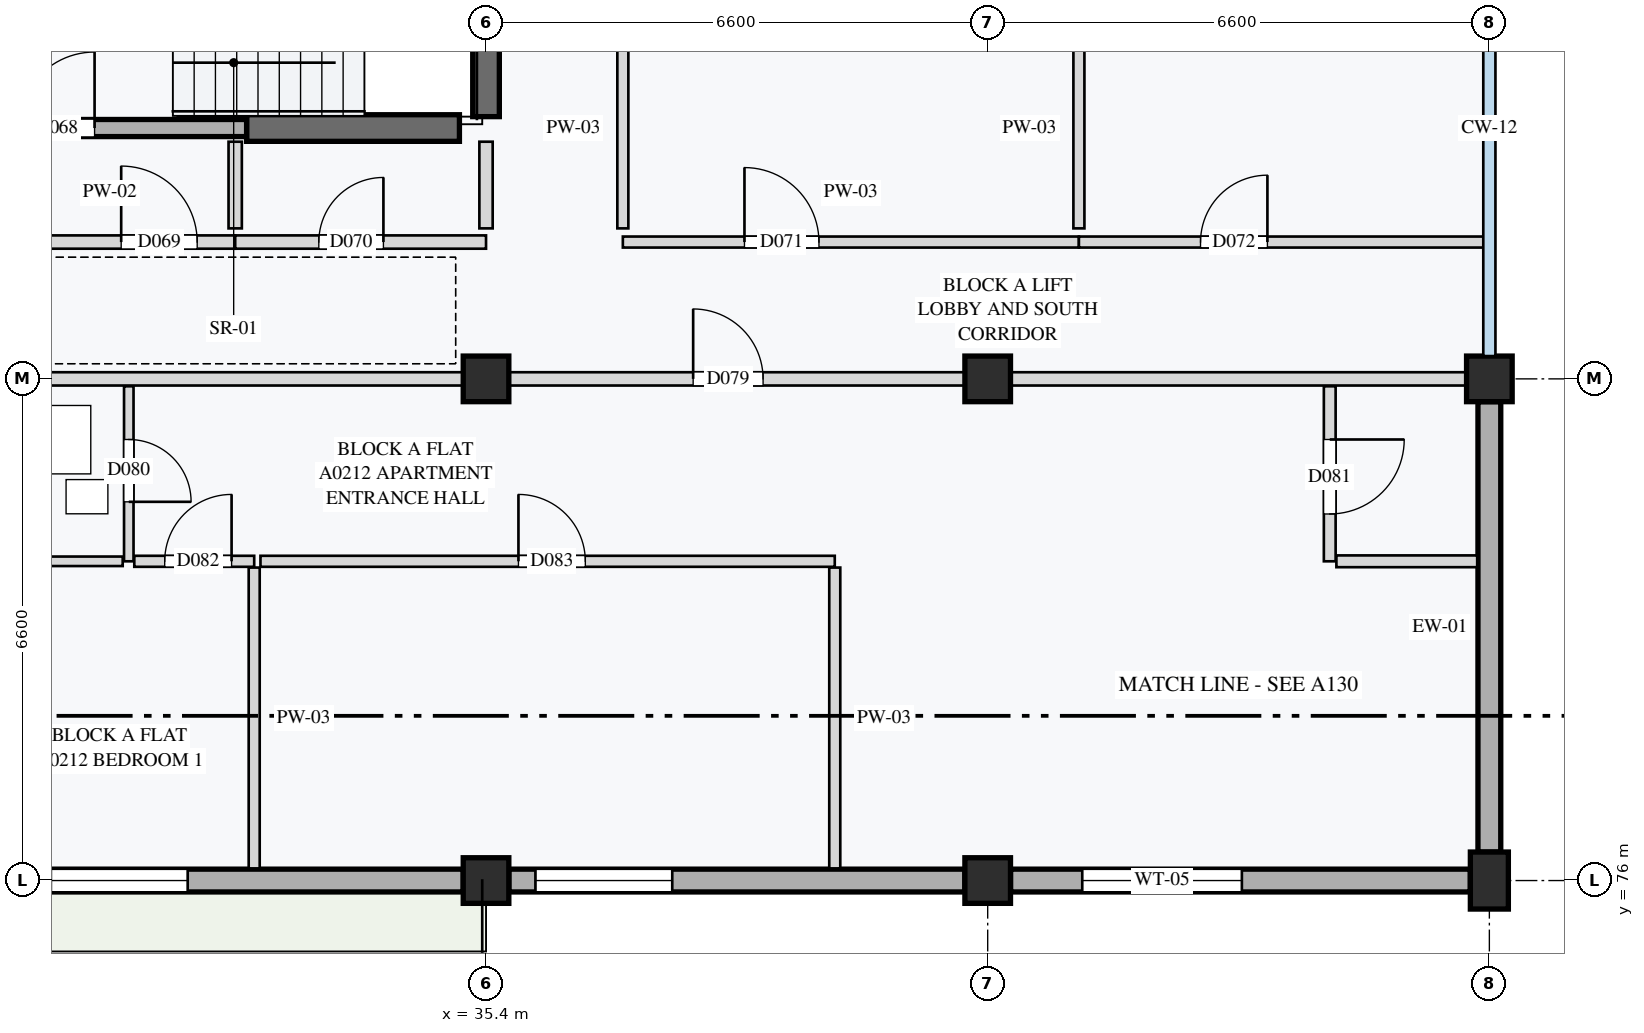
"""IFC4 building model, lengths in metres.
Left out: names, types, materials, properties, quantities, classifications, styles, units other than length and angle.
Written with IfcOpenShell. Run it as: python <this file> out.ifc"""

import sys

from ifc_helpers import new_model, si_unit, direction, frame, frame_2d, origin, origin_2d, place, context, subcontext, project, spatial, rectangle, extrude, element, fill, save


model = new_model("IFC4")
c1 = context("Model", 3, precision=1e-05, world=origin(), true_north=direction((0.0, 1.0)))
c2 = subcontext(c1, "Body", "Model", "MODEL_VIEW")
j1 = project(units=[si_unit("LENGTHUNIT", "METRE"), si_unit("PLANEANGLEUNIT", "RADIAN")], contexts=[c1])
p1 = place(None, origin())
s1 = spatial("IfcSite", under=j1, at=p1, CompositionType="ELEMENT")
p2 = place(p1, origin())
s2 = spatial("IfcBuilding", under=s1, at=p2, CompositionType="ELEMENT")
p3 = place(p2, frame((0.0, 0.0, 8.4)))
s3 = spatial("IfcBuildingStorey", under=s2, at=p3, CompositionType="ELEMENT", Elevation=8.4)
for number, where, z_axis, x_axis in (
    (1, (35.4, 76.0, 0.0), (0.0, 0.0, 1.0), (1.0, 0.0, 0.0)),
    (2, (35.4, 82.6, 0.0), (0.0, 0.0, 1.0), (1.0, 0.0, 0.0)),
    (3, (42.0, 76.0, 0.0), (0.0, 0.0, 1.0), (1.0, 0.0, 0.0)),
    (4, (42.0, 82.6, 0.0), (0.0, 0.0, 1.0), (1.0, 0.0, 0.0)),
):
    element("IfcColumn", number, at=place(p3, frame(where, z_axis=z_axis, x_axis=x_axis)), inside=s3, PredefinedType="COLUMN", context=c2, shape_type="SweptSolid", body=[
        extrude(rectangle(XDim=0.6, YDim=0.6, at=origin_2d()), origin(), (0.0, 0.0, 1.0), 3.2),
    ])
p4 = place(p3, frame((48.6, 76.0, 0.0), z_axis=(0.0, 0.0, 1.0), x_axis=(1.0, 0.0, 0.0)))
e5 = element("IfcColumn", 5, at=p4, inside=s3, PredefinedType="COLUMN", context=c2, shape_type="SweptSolid", body=[
    extrude(rectangle(XDim=0.5, YDim=0.75, at=origin_2d()), origin(), (0.0, 0.0, 1.0), 3.2),
])
p5 = place(p3, frame((48.6, 82.6, 0.0), z_axis=(0.0, 0.0, 1.0), x_axis=(1.0, 0.0, 0.0)))
e6 = element("IfcColumn", 6, at=p5, inside=s3, PredefinedType="COLUMN", context=c2, shape_type="SweptSolid", body=[
    extrude(rectangle(XDim=0.6, YDim=0.6, at=origin_2d()), origin(), (0.0, 0.0, 1.0), 3.2),
])
for number, where, z_axis, x_axis in (
    (7, (32.25, 85.9, 0.0), (0.0, 0.0, 1.0), (1.0, 0.0, 0.0)),
    (8, (35.4, 86.05, 0.0), (0.0, 0.0, 1.0), (0.0, 1.0, 0.0)),
):
    element("IfcWall", number, at=place(p3, frame(where, z_axis=z_axis, x_axis=x_axis)), inside=s3, PredefinedType="SHEAR", context=c2, shape_type="SweptSolid", body=[
        extrude(rectangle(XDim=2.8, YDim=0.35, at=frame_2d((1.4, 0.0))), origin(), (0.0, 0.0, 1.0), 2.96),
    ])
p6 = place(p3, frame((29.1, 76.0, 0.0), z_axis=(0.0, 0.0, 1.0), x_axis=(1.0, 0.0, 0.0)))
e9 = element("IfcWall", 9, at=p6, inside=s3, PredefinedType="STANDARD", context=c2, shape_type="SweptSolid", body=[
    extrude(rectangle(XDim=6.0, YDim=0.3, at=frame_2d((3.0, 0.0))), origin(), (0.0, 0.0, 1.0), 2.65),
])
p7 = place(p6, frame((0.575, 0.0, 0.85)))
e10 = element("IfcOpeningElement", 10, at=p7, cuts=e9, PredefinedType="OPENING", context=c2, shape_type="SweptSolid", body=[
    extrude(rectangle(XDim=1.8, YDim=1.35, at=frame_2d((0.9, 0.675))), frame((0.0, 0.16, 0.0), z_axis=(0.0, -1.0, 0.0), x_axis=(1.0, 0.0, 0.0)), (0.0, 0.0, 1.0), 0.32),
])
p8 = place(p3, frame((35.7, 76.0, 0.0), z_axis=(0.0, 0.0, 1.0), x_axis=(1.0, 0.0, 0.0)))
e11 = element("IfcWall", 11, at=p8, inside=s3, PredefinedType="STANDARD", context=c2, shape_type="SweptSolid", body=[
    extrude(rectangle(XDim=6.0, YDim=0.3, at=frame_2d((3.0, 0.0))), origin(), (0.0, 0.0, 1.0), 2.65),
])
p9 = place(p8, frame((0.35, 0.0, 0.85)))
e12 = element("IfcOpeningElement", 12, at=p9, cuts=e11, PredefinedType="OPENING", context=c2, shape_type="SweptSolid", body=[
    extrude(rectangle(XDim=1.8, YDim=1.35, at=frame_2d((0.9, 0.675))), frame((0.0, 0.16, 0.0), z_axis=(0.0, -1.0, 0.0), x_axis=(1.0, 0.0, 0.0)), (0.0, 0.0, 1.0), 0.32),
])
p10 = place(p3, frame((42.3, 76.0, 0.0), z_axis=(0.0, 0.0, 1.0), x_axis=(1.0, 0.0, 0.0)))
e13 = element("IfcWall", 13, at=p10, inside=s3, PredefinedType="STANDARD", context=c2, shape_type="SweptSolid", body=[
    extrude(rectangle(XDim=6.05, YDim=0.3, at=frame_2d((3.025, 0.0))), origin(), (0.0, 0.0, 1.0), 2.65),
])
p11 = place(p10, frame((0.944, 0.0, 0.85)))
e14 = element("IfcOpeningElement", 14, at=p11, cuts=e13, PredefinedType="OPENING", context=c2, shape_type="SweptSolid", body=[
    extrude(rectangle(XDim=2.1, YDim=1.55, at=frame_2d((1.05, 0.775))), frame((0.0, 0.16, 0.0), z_axis=(0.0, -1.0, 0.0), x_axis=(1.0, 0.0, 0.0)), (0.0, 0.0, 1.0), 0.32),
])
p12 = place(p3, frame((48.6, 76.375, 0.0), z_axis=(0.0, 0.0, 1.0), x_axis=(0.0, 1.0, 0.0)))
e15 = element("IfcWall", 15, at=p12, inside=s3, PredefinedType="STANDARD", context=c2, shape_type="SweptSolid", body=[
    extrude(rectangle(XDim=5.925, YDim=0.3, at=frame_2d((2.962, 0.0))), origin(), (0.0, 0.0, 1.0), 2.65),
])
p13 = place(p3, frame((28.8, 85.9, 0.0), z_axis=(0.0, 0.0, 1.0), x_axis=(1.0, 0.0, 0.0)))
e16 = element("IfcWall", 16, at=p13, inside=s3, PredefinedType="STANDARD", context=c2, shape_type="SweptSolid", body=[
    extrude(rectangle(XDim=3.45, YDim=0.225, at=frame_2d((1.725, 0.0))), origin(), (0.0, 0.0, 1.0), 2.96),
])
p14 = place(p13, frame((0.45, 0.0, 0.0)))
e17 = element("IfcOpeningElement", 17, at=p14, cuts=e16, PredefinedType="OPENING", context=c2, shape_type="SweptSolid", body=[
    extrude(rectangle(XDim=1.0, YDim=2.1, at=frame_2d((0.5, 1.05))), frame((0.0, 0.123, 0.0), z_axis=(0.0, -1.0, 0.0), x_axis=(1.0, 0.0, 0.0)), (0.0, 0.0, 1.0), 0.245),
])
p15 = place(p3, frame((28.8, 84.4, 0.0), z_axis=(0.0, 0.0, 1.0), x_axis=(1.0, 0.0, 0.0)))
e18 = element("IfcWall", 18, at=p15, inside=s3, PredefinedType="PARTITIONING", context=c2, shape_type="SweptSolid", body=[
    extrude(rectangle(XDim=3.3, YDim=0.175, at=frame_2d((1.65, 0.0))), origin(), (0.0, 0.0, 1.0), 2.96),
])
p16 = place(p15, frame((1.8, 0.0, 0.0)))
e19 = element("IfcOpeningElement", 19, at=p16, cuts=e18, PredefinedType="OPENING", context=c2, shape_type="SweptSolid", body=[
    extrude(rectangle(XDim=1.0, YDim=2.16, at=frame_2d((0.5, 1.08))), frame((0.0, 0.097, 0.0), z_axis=(0.0, -1.0, 0.0), x_axis=(1.0, 0.0, 0.0)), (0.0, 0.0, 1.0), 0.195),
])
p17 = place(p3, frame((32.1, 84.4, 0.0), z_axis=(0.0, 0.0, 1.0), x_axis=(1.0, 0.0, 0.0)))
e20 = element("IfcWall", 20, at=p17, inside=s3, PredefinedType="PARTITIONING", context=c2, shape_type="SweptSolid", body=[
    extrude(rectangle(XDim=3.3, YDim=0.175, at=frame_2d((1.65, 0.0))), origin(), (0.0, 0.0, 1.0), 2.96),
])
p18 = place(p17, frame((1.1, 0.0, 0.0)))
e21 = element("IfcOpeningElement", 21, at=p18, cuts=e20, PredefinedType="OPENING", context=c2, shape_type="SweptSolid", body=[
    extrude(rectangle(XDim=0.85, YDim=2.0, at=frame_2d((0.425, 1.0))), frame((0.0, 0.097, 0.0), z_axis=(0.0, -1.0, 0.0), x_axis=(1.0, 0.0, 0.0)), (0.0, 0.0, 1.0), 0.195),
])
for number, where, z_axis, x_axis in (
    (22, (32.1, 84.58, 0.0), (0.0, 0.0, 1.0), (0.0, 1.0, 0.0)),
    (23, (35.4, 84.58, 0.0), (0.0, 0.0, 1.0), (0.0, 1.0, 0.0)),
):
    element("IfcWall", number, at=place(p3, frame(where, z_axis=z_axis, x_axis=x_axis)), inside=s3, PredefinedType="PARTITIONING", context=c2, shape_type="SweptSolid", body=[
        extrude(rectangle(XDim=1.14, YDim=0.175, at=frame_2d((0.57, 0.0))), origin(), (0.0, 0.0, 1.0), 2.96),
    ])
p19 = place(p3, frame((37.2, 84.4, 0.0), z_axis=(0.0, 0.0, 1.0), x_axis=(1.0, 0.0, 0.0)))
e24 = element("IfcWall", 24, at=p19, inside=s3, PredefinedType="PARTITIONING", context=c2, shape_type="SweptSolid", body=[
    extrude(rectangle(XDim=6.0, YDim=0.145, at=frame_2d((3.0, 0.0))), origin(), (0.0, 0.0, 1.0), 2.96),
])
p20 = place(p19, frame((1.6, 0.0, 0.0)))
e25 = element("IfcOpeningElement", 25, at=p20, cuts=e24, PredefinedType="OPENING", context=c2, shape_type="SweptSolid", body=[
    extrude(rectangle(XDim=0.98, YDim=2.12, at=frame_2d((0.49, 1.06))), frame((0.0, 0.083, 0.0), z_axis=(0.0, -1.0, 0.0), x_axis=(1.0, 0.0, 0.0)), (0.0, 0.0, 1.0), 0.165),
])
p21 = place(p3, frame((43.2, 84.4, 0.0), z_axis=(0.0, 0.0, 1.0), x_axis=(1.0, 0.0, 0.0)))
e26 = element("IfcWall", 26, at=p21, inside=s3, PredefinedType="PARTITIONING", context=c2, shape_type="SweptSolid", body=[
    extrude(rectangle(XDim=5.4, YDim=0.145, at=frame_2d((2.7, 0.0))), origin(), (0.0, 0.0, 1.0), 2.96),
])
p22 = place(p21, frame((1.6, 0.0, 0.0)))
e27 = element("IfcOpeningElement", 27, at=p22, cuts=e26, PredefinedType="OPENING", context=c2, shape_type="SweptSolid", body=[
    extrude(rectangle(XDim=0.88, YDim=2.1, at=frame_2d((0.44, 1.05))), frame((0.0, 0.083, 0.0), z_axis=(0.0, -1.0, 0.0), x_axis=(1.0, 0.0, 0.0)), (0.0, 0.0, 1.0), 0.165),
])
for number, where, z_axis, x_axis in (
    (28, (43.2, 84.58, 0.0), (0.0, 0.0, 1.0), (0.0, 1.0, 0.0)),
    (29, (37.2, 84.58, 0.0), (0.0, 0.0, 1.0), (0.0, 1.0, 0.0)),
):
    element("IfcWall", number, at=place(p3, frame(where, z_axis=z_axis, x_axis=x_axis)), inside=s3, PredefinedType="PARTITIONING", context=c2, shape_type="SweptSolid", body=[
        extrude(rectangle(XDim=2.64, YDim=0.145, at=frame_2d((1.32, 0.0))), origin(), (0.0, 0.0, 1.0), 2.96),
    ])
p23 = place(p3, frame((28.8, 82.6, 0.0), z_axis=(0.0, 0.0, 1.0), x_axis=(1.0, 0.0, 0.0)))
e30 = element("IfcWall", 30, at=p23, inside=s3, PredefinedType="PARTITIONING", context=c2, shape_type="SweptSolid", body=[
    extrude(rectangle(XDim=19.8, YDim=0.175, at=frame_2d((9.9, 0.0))), origin(), (0.0, 0.0, 1.0), 2.55),
])
p24 = place(p23, frame((9.325, 0.0, 0.0)))
e31 = element("IfcOpeningElement", 31, at=p24, cuts=e30, PredefinedType="OPENING", context=c2, shape_type="SweptSolid", body=[
    extrude(rectangle(XDim=0.92, YDim=2.14, at=frame_2d((0.46, 1.07))), frame((0.0, 0.097, 0.0), z_axis=(0.0, -1.0, 0.0), x_axis=(1.0, 0.0, 0.0)), (0.0, 0.0, 1.0), 0.195),
])
p25 = place(p3, frame((30.7, 82.502, 0.0), z_axis=(0.0, 0.0, 1.0), x_axis=(0.0, -1.0, 0.0)))
e32 = element("IfcWall", 32, at=p25, inside=s3, PredefinedType="PARTITIONING", context=c2, shape_type="SweptSolid", body=[
    extrude(rectangle(XDim=2.302, YDim=0.125, at=frame_2d((1.151, 0.0))), origin(), (0.0, 0.0, 1.0), 2.96),
])
p26 = place(p25, frame((0.7, 0.0, 0.0)))
e33 = element("IfcOpeningElement", 33, at=p26, cuts=e32, PredefinedType="OPENING", context=c2, shape_type="SweptSolid", body=[
    extrude(rectangle(XDim=0.82, YDim=2.05, at=frame_2d((0.41, 1.025))), frame((0.0, 0.073, 0.0), z_axis=(0.0, -1.0, 0.0), x_axis=(1.0, 0.0, 0.0)), (0.0, 0.0, 1.0), 0.145),
])
p27 = place(p3, frame((28.985, 80.2, 0.0), z_axis=(0.0, 0.0, 1.0), x_axis=(1.0, 0.0, 0.0)))
e34 = element("IfcWall", 34, at=p27, inside=s3, PredefinedType="PARTITIONING", context=c2, shape_type="SweptSolid", body=[
    extrude(rectangle(XDim=1.635, YDim=0.125, at=frame_2d((0.817, 0.0))), origin(), (0.0, 0.0, 1.0), 2.96),
])
p28 = place(p3, frame((46.5, 82.502, 0.0), z_axis=(0.0, 0.0, 1.0), x_axis=(0.0, -1.0, 0.0)))
e35 = element("IfcWall", 35, at=p28, inside=s3, PredefinedType="PARTITIONING", context=c2, shape_type="SweptSolid", body=[
    extrude(rectangle(XDim=2.302, YDim=0.155, at=frame_2d((1.151, 0.0))), origin(), (0.0, 0.0, 1.0), 2.96),
])
p29 = place(p28, frame((0.7, 0.0, 0.0)))
e36 = element("IfcOpeningElement", 36, at=p29, cuts=e35, PredefinedType="OPENING", context=c2, shape_type="SweptSolid", body=[
    extrude(rectangle(XDim=0.98, YDim=2.12, at=frame_2d((0.49, 1.06))), frame((0.0, 0.087, 0.0), z_axis=(0.0, -1.0, 0.0), x_axis=(1.0, 0.0, 0.0)), (0.0, 0.0, 1.0), 0.175),
])
p30 = place(p3, frame((46.587, 80.2, 0.0), z_axis=(0.0, 0.0, 1.0), x_axis=(1.0, 0.0, 0.0)))
e37 = element("IfcWall", 37, at=p30, inside=s3, PredefinedType="PARTITIONING", context=c2, shape_type="SweptSolid", body=[
    extrude(rectangle(XDim=1.853, YDim=0.155, at=frame_2d((0.926, 0.0))), origin(), (0.0, 0.0, 1.0), 2.96),
])
p31 = place(p3, frame((30.772, 80.2, 0.0), z_axis=(0.0, 0.0, 1.0), x_axis=(1.0, 0.0, 0.0)))
e38 = element("IfcWall", 38, at=p31, inside=s3, PredefinedType="PARTITIONING", context=c2, shape_type="SweptSolid", body=[
    extrude(rectangle(XDim=1.578, YDim=0.145, at=frame_2d((0.789, 0.0))), origin(), (0.0, 0.0, 1.0), 2.96),
])
p32 = place(p31, frame((0.4, 0.0, 0.0)))
e39 = element("IfcOpeningElement", 39, at=p32, cuts=e38, PredefinedType="OPENING", context=c2, shape_type="SweptSolid", body=[
    extrude(rectangle(XDim=0.88, YDim=2.1, at=frame_2d((0.44, 1.05))), frame((0.0, 0.083, 0.0), z_axis=(0.0, -1.0, 0.0), x_axis=(1.0, 0.0, 0.0)), (0.0, 0.0, 1.0), 0.165),
])
p33 = place(p3, frame((32.35, 80.117, 0.0), z_axis=(0.0, 0.0, 1.0), x_axis=(0.0, -1.0, 0.0)))
e40 = element("IfcWall", 40, at=p33, inside=s3, PredefinedType="PARTITIONING", context=c2, shape_type="SweptSolid", body=[
    extrude(rectangle(XDim=3.958, YDim=0.145, at=frame_2d((1.979, 0.0))), origin(), (0.0, 0.0, 1.0), 2.96),
])
p34 = place(p3, frame((32.433, 80.2, 0.0), z_axis=(0.0, 0.0, 1.0), x_axis=(1.0, 0.0, 0.0)))
e41 = element("IfcWall", 41, at=p34, inside=s3, PredefinedType="PARTITIONING", context=c2, shape_type="SweptSolid", body=[
    extrude(rectangle(XDim=7.555, YDim=0.145, at=frame_2d((3.778, 0.0))), origin(), (0.0, 0.0, 1.0), 2.96),
])
p35 = place(p34, frame((3.394, 0.0, 0.0)))
e42 = element("IfcOpeningElement", 42, at=p35, cuts=e41, PredefinedType="OPENING", context=c2, shape_type="SweptSolid", body=[
    extrude(rectangle(XDim=0.88, YDim=2.16, at=frame_2d((0.44, 1.08))), frame((0.0, 0.083, 0.0), z_axis=(0.0, -1.0, 0.0), x_axis=(1.0, 0.0, 0.0)), (0.0, 0.0, 1.0), 0.165),
])
p36 = place(p3, frame((39.988, 80.117, 0.0), z_axis=(0.0, 0.0, 1.0), x_axis=(0.0, -1.0, 0.0)))
e43 = element("IfcWall", 43, at=p36, inside=s3, PredefinedType="PARTITIONING", context=c2, shape_type="SweptSolid", body=[
    extrude(rectangle(XDim=3.958, YDim=0.145, at=frame_2d((1.979, 0.0))), origin(), (0.0, 0.0, 1.0), 2.96),
])
p37 = place(p7, origin())
e44 = element("IfcWindow", 44, at=p37, inside=s3, PartitioningType="SINGLE_PANEL", PredefinedType="WINDOW", context=c2, shape_type="SweptSolid", body=[
    extrude(rectangle(XDim=1.8, YDim=1.35, at=frame_2d((0.9, 0.675))), frame((0.0, 0.03, 0.0), z_axis=(0.0, -1.0, 0.0), x_axis=(1.0, 0.0, 0.0)), (0.0, 0.0, 1.0), 0.06),
])
fill(e10, e44)
p38 = place(p9, origin())
e45 = element("IfcWindow", 45, at=p38, inside=s3, PartitioningType="SINGLE_PANEL", PredefinedType="WINDOW", context=c2, shape_type="SweptSolid", body=[
    extrude(rectangle(XDim=1.8, YDim=1.35, at=frame_2d((0.9, 0.675))), frame((0.0, 0.03, 0.0), z_axis=(0.0, -1.0, 0.0), x_axis=(1.0, 0.0, 0.0)), (0.0, 0.0, 1.0), 0.06),
])
fill(e12, e45)
p39 = place(p11, origin())
e46 = element("IfcWindow", 46, at=p39, inside=s3, PartitioningType="SINGLE_PANEL", PredefinedType="WINDOW", context=c2, shape_type="SweptSolid", body=[
    extrude(rectangle(XDim=2.1, YDim=1.55, at=frame_2d((1.05, 0.775))), frame((0.0, 0.03, 0.0), z_axis=(0.0, -1.0, 0.0), x_axis=(1.0, 0.0, 0.0)), (0.0, 0.0, 1.0), 0.06),
])
fill(e14, e46)
p40 = place(p14, origin())
e47 = element("IfcDoor", 47, at=p40, inside=s3, OperationType="SINGLE_SWING_RIGHT", PredefinedType="DOOR", context=c2, shape_type="SweptSolid", body=[
    extrude(rectangle(XDim=1.0, YDim=2.1, at=frame_2d((0.5, 1.05))), frame((0.0, 0.025, 0.0), z_axis=(0.0, -1.0, 0.0), x_axis=(1.0, 0.0, 0.0)), (0.0, 0.0, 1.0), 0.05),
])
fill(e17, e47)
p41 = place(p16, origin())
e48 = element("IfcDoor", 48, at=p41, inside=s3, OperationType="SINGLE_SWING_LEFT", PredefinedType="DOOR", context=c2, shape_type="SweptSolid", body=[
    extrude(rectangle(XDim=1.0, YDim=2.16, at=frame_2d((0.5, 1.08))), frame((0.0, 0.025, 0.0), z_axis=(0.0, -1.0, 0.0), x_axis=(1.0, 0.0, 0.0)), (0.0, 0.0, 1.0), 0.05),
])
fill(e19, e48)
p42 = place(p18, origin())
e49 = element("IfcDoor", 49, at=p42, inside=s3, OperationType="SINGLE_SWING_RIGHT", PredefinedType="DOOR", context=c2, shape_type="SweptSolid", body=[
    extrude(rectangle(XDim=0.85, YDim=2.0, at=frame_2d((0.425, 1.0))), frame((0.0, 0.025, 0.0), z_axis=(0.0, -1.0, 0.0), x_axis=(1.0, 0.0, 0.0)), (0.0, 0.0, 1.0), 0.05),
])
fill(e21, e49)
p43 = place(p20, origin())
e50 = element("IfcDoor", 50, at=p43, inside=s3, OperationType="SINGLE_SWING_LEFT", PredefinedType="DOOR", context=c2, shape_type="SweptSolid", body=[
    extrude(rectangle(XDim=0.98, YDim=2.12, at=frame_2d((0.49, 1.06))), frame((0.0, 0.025, 0.0), z_axis=(0.0, -1.0, 0.0), x_axis=(1.0, 0.0, 0.0)), (0.0, 0.0, 1.0), 0.05),
])
fill(e25, e50)
p44 = place(p22, origin())
e51 = element("IfcDoor", 51, at=p44, inside=s3, OperationType="SINGLE_SWING_RIGHT", PredefinedType="DOOR", context=c2, shape_type="SweptSolid", body=[
    extrude(rectangle(XDim=0.88, YDim=2.1, at=frame_2d((0.44, 1.05))), frame((0.0, 0.025, 0.0), z_axis=(0.0, -1.0, 0.0), x_axis=(1.0, 0.0, 0.0)), (0.0, 0.0, 1.0), 0.05),
])
fill(e27, e51)
p45 = place(p24, origin())
e52 = element("IfcDoor", 52, at=p45, inside=s3, OperationType="SINGLE_SWING_LEFT", PredefinedType="DOOR", context=c2, shape_type="SweptSolid", body=[
    extrude(rectangle(XDim=0.92, YDim=2.14, at=frame_2d((0.46, 1.07))), frame((0.0, 0.025, 0.0), z_axis=(0.0, -1.0, 0.0), x_axis=(1.0, 0.0, 0.0)), (0.0, 0.0, 1.0), 0.05),
])
fill(e31, e52)
p46 = place(p26, origin())
e53 = element("IfcDoor", 53, at=p46, inside=s3, OperationType="SINGLE_SWING_RIGHT", PredefinedType="DOOR", context=c2, shape_type="SweptSolid", body=[
    extrude(rectangle(XDim=0.82, YDim=2.05, at=frame_2d((0.41, 1.025))), frame((0.0, 0.025, 0.0), z_axis=(0.0, -1.0, 0.0), x_axis=(1.0, 0.0, 0.0)), (0.0, 0.0, 1.0), 0.05),
])
fill(e33, e53)
p47 = place(p29, origin())
e54 = element("IfcDoor", 54, at=p47, inside=s3, OperationType="SINGLE_SWING_LEFT", PredefinedType="DOOR", context=c2, shape_type="SweptSolid", body=[
    extrude(rectangle(XDim=0.98, YDim=2.12, at=frame_2d((0.49, 1.06))), frame((0.0, 0.025, 0.0), z_axis=(0.0, -1.0, 0.0), x_axis=(1.0, 0.0, 0.0)), (0.0, 0.0, 1.0), 0.05),
])
fill(e36, e54)
p48 = place(p32, origin())
e55 = element("IfcDoor", 55, at=p48, inside=s3, OperationType="SINGLE_SWING_RIGHT", PredefinedType="DOOR", context=c2, shape_type="SweptSolid", body=[
    extrude(rectangle(XDim=0.88, YDim=2.1, at=frame_2d((0.44, 1.05))), frame((0.0, 0.025, 0.0), z_axis=(0.0, -1.0, 0.0), x_axis=(1.0, 0.0, 0.0)), (0.0, 0.0, 1.0), 0.05),
])
fill(e39, e55)
p49 = place(p35, origin())
e56 = element("IfcDoor", 56, at=p49, inside=s3, OperationType="SINGLE_SWING_LEFT", PredefinedType="DOOR", context=c2, shape_type="SweptSolid", body=[
    extrude(rectangle(XDim=0.88, YDim=2.16, at=frame_2d((0.44, 1.08))), frame((0.0, 0.025, 0.0), z_axis=(0.0, -1.0, 0.0), x_axis=(1.0, 0.0, 0.0)), (0.0, 0.0, 1.0), 0.05),
])
fill(e42, e56)
save(model, sys.argv[1])
